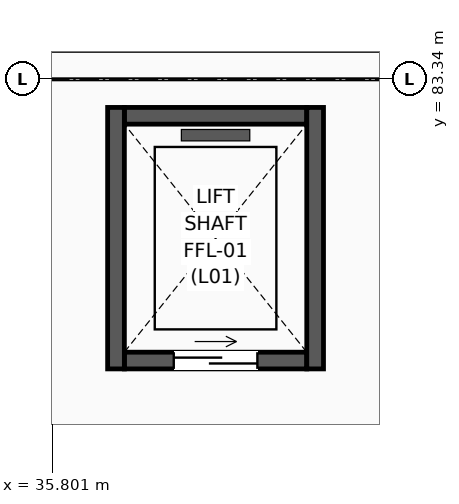
"""IFC4 building model, lengths in metres.
Left out: names, types, materials, properties, quantities, classifications, styles, units other than length and angle.
Written with IfcOpenShell. Run it as: python <this file> out.ifc"""

import sys

from ifc_helpers import new_model, si_unit, direction, frame, frame_2d, origin, place, context, subcontext, project, spatial, rectangle, extrude, element, fill, save


model = new_model("IFC4")
c1 = context("Model", 3, precision=1e-05, world=origin(), true_north=direction((0.0, 1.0)))
c2 = subcontext(c1, "Body", "Model", "MODEL_VIEW")
j1 = project(units=[si_unit("LENGTHUNIT", "METRE"), si_unit("PLANEANGLEUNIT", "RADIAN")], contexts=[c1])
p1 = place(None, origin())
s1 = spatial("IfcSite", under=j1, at=p1, CompositionType="ELEMENT")
p2 = place(p1, origin())
s2 = spatial("IfcBuilding", under=s1, at=p2, CompositionType="ELEMENT")
p3 = place(p2, frame((0.0, 0.0, 5.4)))
s3 = spatial("IfcBuildingStorey", under=s2, at=p3, CompositionType="ELEMENT", Elevation=5.4)
p4 = place(p3, frame((36.75, 79.64, 0.0), z_axis=(0.0, 0.0, 1.0), x_axis=(1.0, 0.0, 0.0)))
e1 = element("IfcWall", 1, at=p4, inside=s3, PredefinedType="SOLIDWALL", context=c2, shape_type="SweptSolid", body=[
    extrude(rectangle(XDim=2.4, YDim=0.22, at=frame_2d((1.2, 0.0))), origin(), (0.0, 0.0, 1.0), 4.525),
])
p5 = place(p4, frame((0.65, 0.0, 0.0)))
e2 = element("IfcOpeningElement", 2, at=p5, cuts=e1, PredefinedType="OPENING", context=c2, shape_type="SweptSolid", body=[
    extrude(rectangle(XDim=1.1, YDim=2.2, at=frame_2d((0.55, 1.1))), frame((0.0, 0.12, 0.0), z_axis=(0.0, -1.0, 0.0), x_axis=(1.0, 0.0, 0.0)), (0.0, 0.0, 1.0), 0.24),
])
p6 = place(p3, frame((36.75, 82.86, 0.0), z_axis=(0.0, 0.0, 1.0), x_axis=(1.0, 0.0, 0.0)))
e3 = element("IfcWall", 3, at=p6, inside=s3, PredefinedType="SOLIDWALL", context=c2, shape_type="SweptSolid", body=[
    extrude(rectangle(XDim=2.4, YDim=0.22, at=frame_2d((1.2, 0.0))), origin(), (0.0, 0.0, 1.0), 4.525),
])
for number, where, z_axis, x_axis in (
    (4, (36.64, 79.53, 0.0), (0.0, 0.0, 1.0), (0.0, 1.0, 0.0)),
    (5, (39.26, 79.53, 0.0), (0.0, 0.0, 1.0), (0.0, 1.0, 0.0)),
):
    element("IfcWall", number, at=place(p3, frame(where, z_axis=z_axis, x_axis=x_axis)), inside=s3, PredefinedType="SOLIDWALL", context=c2, shape_type="SweptSolid", body=[
        extrude(rectangle(XDim=3.44, YDim=0.22, at=frame_2d((1.72, 0.0))), origin(), (0.0, 0.0, 1.0), 4.525),
    ])
p7 = place(p5, origin())
e6 = element("IfcDoor", 6, at=p7, inside=s3, OperationType="SLIDING_TO_LEFT", PredefinedType="DOOR", context=c2, shape_type="SweptSolid", body=[
    extrude(rectangle(XDim=1.1, YDim=2.2, at=frame_2d((0.55, 1.1))), frame((0.0, 0.025, 0.0), z_axis=(0.0, -1.0, 0.0), x_axis=(1.0, 0.0, 0.0)), (0.0, 0.0, 1.0), 0.05),
])
fill(e2, e6)
save(model, sys.argv[1])
